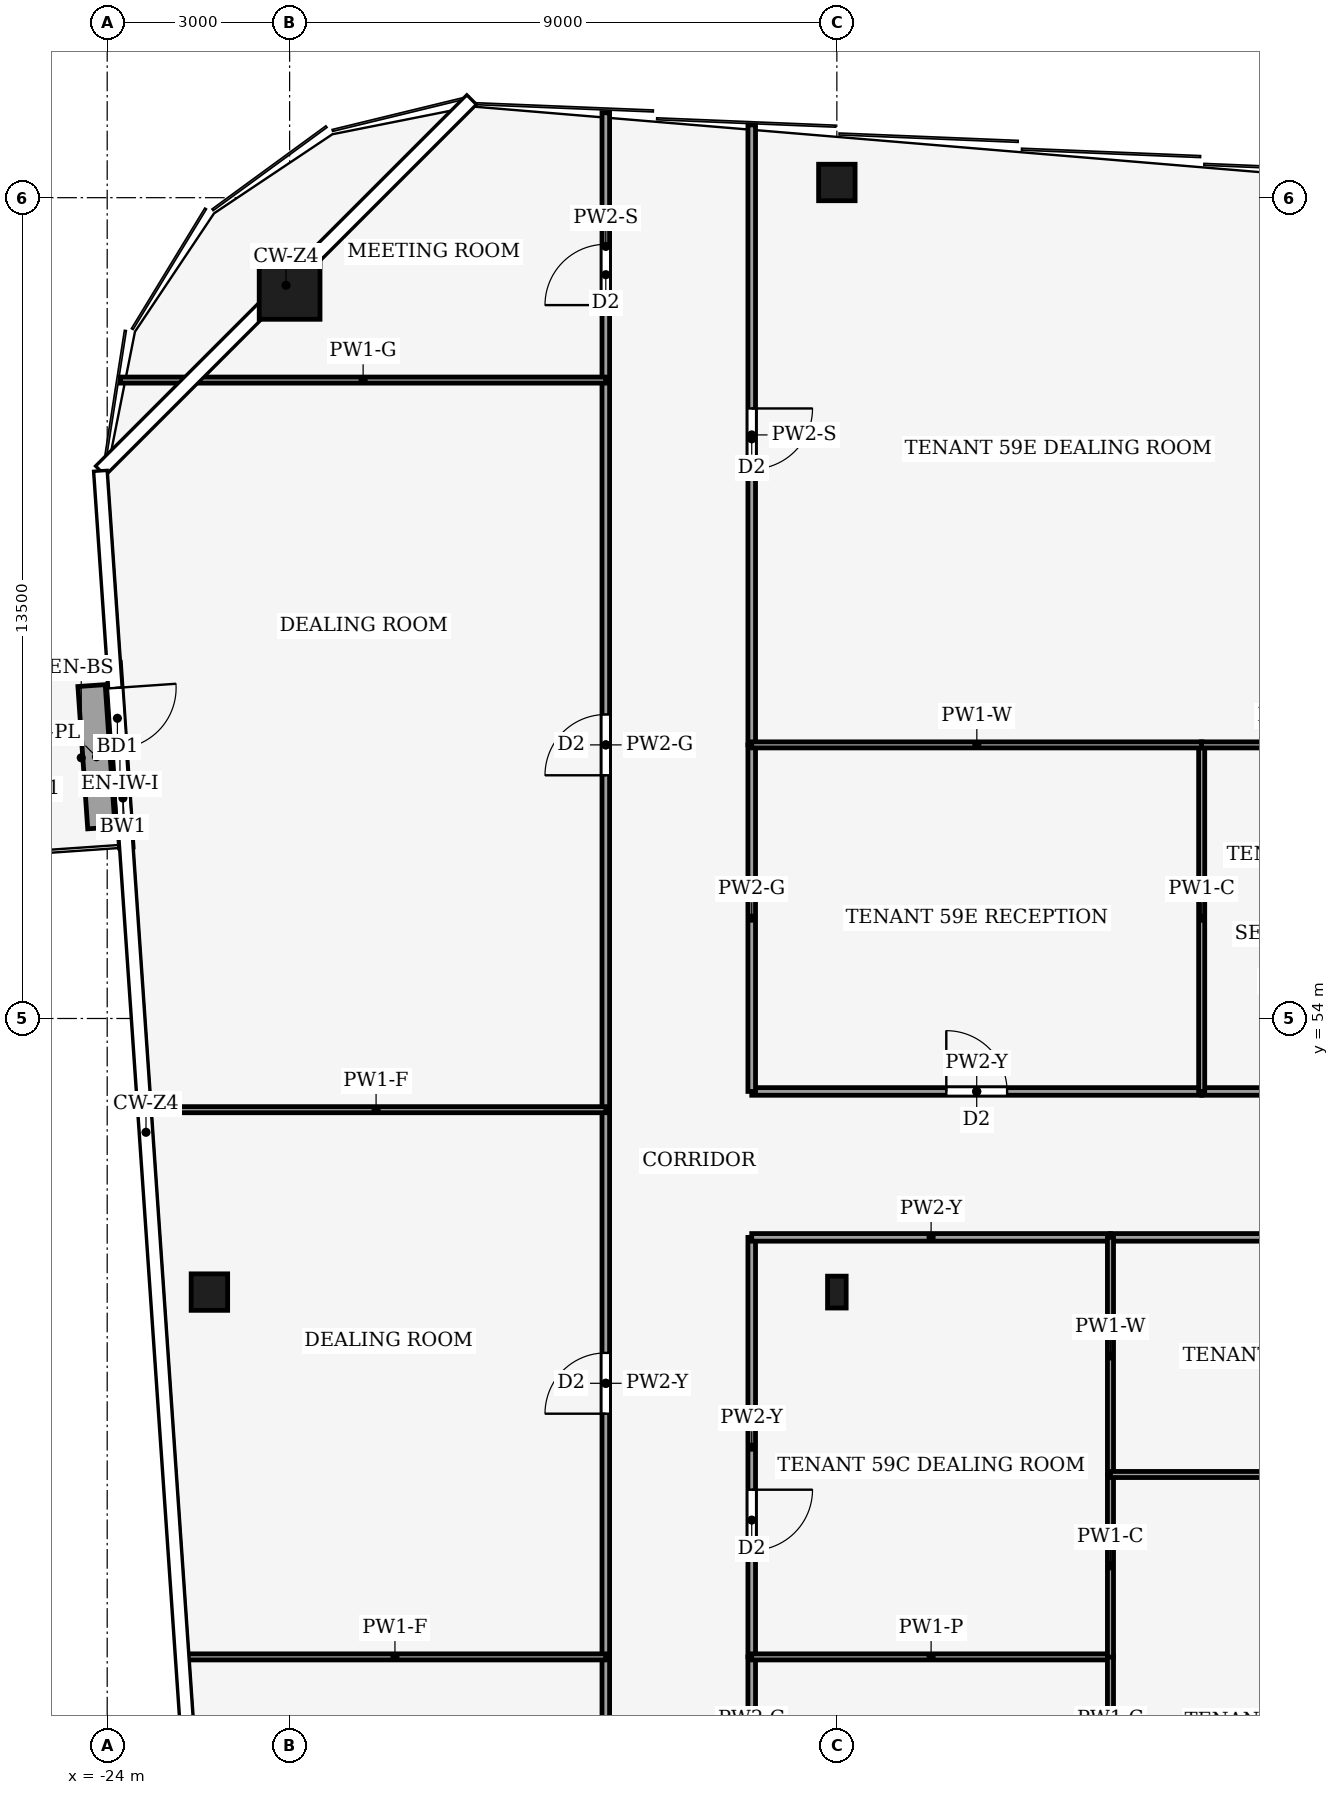
"""IFC4 building model, lengths in metres.
Left out: names, types, materials, properties, quantities, classifications, styles, units other than length and angle.
Written with IfcOpenShell. Run it as: python <this file> out.ifc"""

import sys

from ifc_helpers import new_model, si_unit, direction, frame, frame_2d, origin, origin_2d, place, context, subcontext, project, spatial, rectangle, hollow_rectangle, i_section, extrude, element, fill, save


model = new_model("IFC4")
c1 = context("Model", 3, precision=1e-05, world=origin(), true_north=direction((0.0, 1.0)))
c2 = subcontext(c1, "Body", "Model", "MODEL_VIEW")
j1 = project(units=[si_unit("LENGTHUNIT", "METRE"), si_unit("PLANEANGLEUNIT", "RADIAN")], contexts=[c1])
p1 = place(None, origin())
s1 = spatial("IfcSite", under=j1, at=p1, CompositionType="ELEMENT")
p2 = place(p1, origin())
s2 = spatial("IfcBuilding", under=s1, at=p2, CompositionType="ELEMENT")
p3 = place(p2, frame((0.0, 0.0, 258.0)))
s3 = spatial("IfcBuildingStorey", under=s2, at=p3, CompositionType="ELEMENT", Elevation=258.0)
p4 = place(p3, frame((-21.0, 66.0, 0.0), z_axis=(0.0, 0.0, 1.0), x_axis=(1.0, 0.0, 0.0)))
e1 = element("IfcColumn", 1, at=p4, inside=s3, PredefinedType="COLUMN", context=c2, shape_type="SweptSolid", body=[
    extrude(hollow_rectangle(XDim=1.0, YDim=1.0, WallThickness=0.045, at=origin_2d()), origin(), (0.0, 0.0, 1.0), 4.0),
])
for number, where, z_axis, x_axis in (
    (2, (-12.0, 67.75, 0.0), (0.0, 0.0, 1.0), (1.0, 0.0, 0.0)),
    (3, (-22.319, 49.5, 0.0), (0.0, 0.0, 1.0), (1.0, 0.0, 0.0)),
):
    element("IfcColumn", number, at=place(p3, frame(where, z_axis=z_axis, x_axis=x_axis)), inside=s3, PredefinedType="COLUMN", context=c2, shape_type="SweptSolid", body=[
        extrude(hollow_rectangle(XDim=0.6, YDim=0.6, WallThickness=0.025, at=origin_2d()), origin(), (0.0, 0.0, 1.0), 4.0),
    ])
p5 = place(p3, frame((-12.0, 49.5, 0.0), z_axis=(0.0, 0.0, 1.0), x_axis=(1.0, 0.0, 0.0)))
e4 = element("IfcColumn", 4, at=p5, inside=s3, PredefinedType="COLUMN", context=c2, shape_type="SweptSolid", body=[
    extrude(i_section(OverallWidth=0.306, OverallDepth=0.524, WebThickness=0.012, FlangeThickness=0.04, FilletRadius=0.027, at=origin_2d()), origin(), (0.0, 0.0, 1.0), 4.0),
])
p6 = place(p3, frame((-23.895, 59.851, 0.0), z_axis=(0.0, 0.0, 1.0), x_axis=(0.06875808698, -0.99763336225, 0.0)))
e5 = element("IfcWall", 5, at=p6, inside=s3, PredefinedType="SOLIDWALL", context=c2, shape_type="SweptSolid", body=[
    extrude(rectangle(XDim=3.047, YDim=0.224, at=frame_2d((1.523, 0.0))), origin(), (0.0, 0.0, 1.0), 3.65),
])
p7 = place(p6, frame((0.416, 0.0, 0.0)))
e6 = element("IfcOpeningElement", 6, at=p7, cuts=e5, PredefinedType="OPENING", context=c2, shape_type="SweptSolid", body=[
    extrude(rectangle(XDim=1.0, YDim=2.1, at=frame_2d((0.5, 1.05))), frame((0.0, 0.122, 0.0), z_axis=(0.0, -1.0, 0.0), x_axis=(1.0, 0.0, 0.0)), (0.0, 0.0, 1.0), 0.244),
])
p8 = place(p6, frame((1.831, 0.0, 0.9)))
e7 = element("IfcOpeningElement", 7, at=p8, cuts=e5, PredefinedType="OPENING", context=c2, shape_type="SweptSolid", body=[
    extrude(rectangle(XDim=0.8, YDim=1.2, at=frame_2d((0.4, 0.6))), frame((0.0, 0.122, 0.0), z_axis=(0.0, -1.0, 0.0), x_axis=(1.0, 0.0, 0.0)), (0.0, 0.0, 1.0), 0.244),
])
p9 = place(p3, frame((-24.257, 59.475, 0.0), z_axis=(0.0, 0.0, 1.0), x_axis=(0.06877709495, -0.997632052016, 0.0)))
e8 = element("IfcWall", 8, at=p9, inside=s3, PredefinedType="USERDEFINED", context=c2, shape_type="SweptSolid", body=[
    extrude(rectangle(XDim=2.346, YDim=0.45, at=frame_2d((1.173, 0.0))), origin(), (0.0, 0.0, 1.0), 0.4),
])
p10 = place(p3, frame((-15.8, 31.5, 0.0), z_axis=(0.0, 0.0, 1.0), x_axis=(0.0, 1.0, 0.0)))
e9 = element("IfcWall", 9, at=p10, inside=s3, PredefinedType="PARTITIONING", context=c2, shape_type="SweptSolid", body=[
    extrude(rectangle(XDim=12.0, YDim=0.125, at=frame_2d((6.0, 0.0))), origin(), (0.0, 0.0, 1.0), 3.14),
])
p11 = place(p10, frame((5.5, 0.0, 0.0)))
e10 = element("IfcOpeningElement", 10, at=p11, cuts=e9, PredefinedType="OPENING", context=c2, shape_type="SweptSolid", body=[
    extrude(rectangle(XDim=1.0, YDim=2.1, at=frame_2d((0.5, 1.05))), frame((0.0, 0.073, 0.0), z_axis=(0.0, -1.0, 0.0), x_axis=(1.0, 0.0, 0.0)), (0.0, 0.0, 1.0), 0.145),
])
p12 = place(p3, frame((-15.8, 43.5, 0.0), z_axis=(0.0, 0.0, 1.0), x_axis=(0.0, 1.0, 0.0)))
e11 = element("IfcWall", 11, at=p12, inside=s3, PredefinedType="PARTITIONING", context=c2, shape_type="SweptSolid", body=[
    extrude(rectangle(XDim=9.0, YDim=0.125, at=frame_2d((4.5, 0.0))), origin(), (0.0, 0.0, 1.0), 3.24),
])
p13 = place(p12, frame((4.0, 0.0, 0.0)))
e12 = element("IfcOpeningElement", 12, at=p13, cuts=e11, PredefinedType="OPENING", context=c2, shape_type="SweptSolid", body=[
    extrude(rectangle(XDim=1.0, YDim=2.1, at=frame_2d((0.5, 1.05))), frame((0.0, 0.073, 0.0), z_axis=(0.0, -1.0, 0.0), x_axis=(1.0, 0.0, 0.0)), (0.0, 0.0, 1.0), 0.145),
])
p14 = place(p3, frame((-15.8, 52.5, 0.0), z_axis=(0.0, 0.0, 1.0), x_axis=(0.0, 1.0, 0.0)))
e13 = element("IfcWall", 13, at=p14, inside=s3, PredefinedType="PARTITIONING", context=c2, shape_type="SweptSolid", body=[
    extrude(rectangle(XDim=12.0, YDim=0.125, at=frame_2d((6.0, 0.0))), origin(), (0.0, 0.0, 1.0), 3.87),
])
p15 = place(p14, frame((5.5, 0.0, 0.0)))
e14 = element("IfcOpeningElement", 14, at=p15, cuts=e13, PredefinedType="OPENING", context=c2, shape_type="SweptSolid", body=[
    extrude(rectangle(XDim=1.0, YDim=2.1, at=frame_2d((0.5, 1.05))), frame((0.0, 0.073, 0.0), z_axis=(0.0, -1.0, 0.0), x_axis=(1.0, 0.0, 0.0)), (0.0, 0.0, 1.0), 0.145),
])
p16 = place(p3, frame((-15.8, 64.5, 0.0), z_axis=(0.0, 0.0, 1.0), x_axis=(0.0, 1.0, 0.0)))
e15 = element("IfcWall", 15, at=p16, inside=s3, PredefinedType="PARTITIONING", context=c2, shape_type="SweptSolid", body=[
    extrude(rectangle(XDim=4.397, YDim=0.125, at=frame_2d((2.198, 0.0))), origin(), (0.0, 0.0, 1.0), 3.04),
])
p17 = place(p16, frame((1.233, 0.0, 0.0)))
e16 = element("IfcOpeningElement", 16, at=p17, cuts=e15, PredefinedType="OPENING", context=c2, shape_type="SweptSolid", body=[
    extrude(rectangle(XDim=1.0, YDim=2.1, at=frame_2d((0.5, 1.05))), frame((0.0, 0.073, 0.0), z_axis=(0.0, -1.0, 0.0), x_axis=(1.0, 0.0, 0.0)), (0.0, 0.0, 1.0), 0.145),
])
p18 = place(p3, frame((-13.4, 40.5, 0.0), z_axis=(0.0, 0.0, 1.0), x_axis=(0.0, 1.0, 0.0)))
e17 = element("IfcWall", 17, at=p18, inside=s3, PredefinedType="PARTITIONING", context=c2, shape_type="SweptSolid", body=[
    extrude(rectangle(XDim=3.0, YDim=0.125, at=frame_2d((1.5, 0.0))), origin(), (0.0, 0.0, 1.0), 3.87),
])
p19 = place(p3, frame((-13.4, 50.4, 0.0), z_axis=(0.0, 0.0, 1.0), x_axis=(0.0, -1.0, 0.0)))
e18 = element("IfcWall", 18, at=p19, inside=s3, PredefinedType="PARTITIONING", context=c2, shape_type="SweptSolid", body=[
    extrude(rectangle(XDim=6.9, YDim=0.125, at=frame_2d((3.45, 0.0))), origin(), (0.0, 0.0, 1.0), 3.24),
])
p20 = place(p19, frame((4.15, 0.0, 0.0)))
e19 = element("IfcOpeningElement", 19, at=p20, cuts=e18, PredefinedType="OPENING", context=c2, shape_type="SweptSolid", body=[
    extrude(rectangle(XDim=1.0, YDim=2.1, at=frame_2d((0.5, 1.05))), frame((0.0, 0.073, 0.0), z_axis=(0.0, -1.0, 0.0), x_axis=(1.0, 0.0, 0.0)), (0.0, 0.0, 1.0), 0.145),
])
p21 = place(p3, frame((-7.5, 50.4, 0.0), z_axis=(0.0, 0.0, 1.0), x_axis=(-1.0, 0.0, 0.0)))
e20 = element("IfcWall", 20, at=p21, inside=s3, PredefinedType="PARTITIONING", context=c2, shape_type="SweptSolid", body=[
    extrude(rectangle(XDim=5.9, YDim=0.125, at=frame_2d((2.95, 0.0))), origin(), (0.0, 0.0, 1.0), 3.24),
])
p22 = place(p3, frame((0.0, 50.4, 0.0), z_axis=(0.0, 0.0, 1.0), x_axis=(-1.0, 0.0, 0.0)))
e21 = element("IfcWall", 21, at=p22, inside=s3, PredefinedType="PARTITIONING", context=c2, shape_type="SweptSolid", body=[
    extrude(rectangle(XDim=7.5, YDim=0.125, at=frame_2d((3.75, 0.0))), origin(), (0.0, 0.0, 1.0), 3.24),
])
p23 = place(p22, frame((3.65, 0.0, 0.0)))
e22 = element("IfcOpeningElement", 22, at=p23, cuts=e21, PredefinedType="OPENING", context=c2, shape_type="SweptSolid", body=[
    extrude(rectangle(XDim=1.0, YDim=2.1, at=frame_2d((0.5, 1.05))), frame((0.0, 0.073, 0.0), z_axis=(0.0, -1.0, 0.0), x_axis=(1.0, 0.0, 0.0)), (0.0, 0.0, 1.0), 0.145),
])
p24 = place(p3, frame((-13.4, 52.8, 0.0), z_axis=(0.0, 0.0, 1.0), x_axis=(1.0, 0.0, 0.0)))
e23 = element("IfcWall", 23, at=p24, inside=s3, PredefinedType="PARTITIONING", context=c2, shape_type="SweptSolid", body=[
    extrude(rectangle(XDim=7.4, YDim=0.125, at=frame_2d((3.7, 0.0))), origin(), (0.0, 0.0, 1.0), 3.24),
])
p25 = place(p24, frame((3.2, 0.0, 0.0)))
e24 = element("IfcOpeningElement", 24, at=p25, cuts=e23, PredefinedType="OPENING", context=c2, shape_type="SweptSolid", body=[
    extrude(rectangle(XDim=1.0, YDim=2.1, at=frame_2d((0.5, 1.05))), frame((0.0, 0.073, 0.0), z_axis=(0.0, -1.0, 0.0), x_axis=(1.0, 0.0, 0.0)), (0.0, 0.0, 1.0), 0.145),
])
p26 = place(p3, frame((-13.4, 52.8, 0.0), z_axis=(0.0, 0.0, 1.0), x_axis=(0.0, 1.0, 0.0)))
e25 = element("IfcWall", 25, at=p26, inside=s3, PredefinedType="PARTITIONING", context=c2, shape_type="SweptSolid", body=[
    extrude(rectangle(XDim=5.7, YDim=0.125, at=frame_2d((2.85, 0.0))), origin(), (0.0, 0.0, 1.0), 3.87),
])
p27 = place(p3, frame((-3.0, 52.8, 0.0), z_axis=(0.0, 0.0, 1.0), x_axis=(-1.0, 0.0, 0.0)))
e26 = element("IfcWall", 26, at=p27, inside=s3, PredefinedType="PARTITIONING", context=c2, shape_type="SweptSolid", body=[
    extrude(rectangle(XDim=3.0, YDim=0.125, at=frame_2d((1.5, 0.0))), origin(), (0.0, 0.0, 1.0), 3.24),
])
p28 = place(p3, frame((-13.4, 68.697, 0.0), z_axis=(0.0, 0.0, 1.0), x_axis=(0.0, -1.0, 0.0)))
e27 = element("IfcWall", 27, at=p28, inside=s3, PredefinedType="PARTITIONING", context=c2, shape_type="SweptSolid", body=[
    extrude(rectangle(XDim=10.197, YDim=0.125, at=frame_2d((5.098, 0.0))), origin(), (0.0, 0.0, 1.0), 3.04),
])
p29 = place(p28, frame((4.663, 0.0, 0.0)))
e28 = element("IfcOpeningElement", 28, at=p29, cuts=e27, PredefinedType="OPENING", context=c2, shape_type="SweptSolid", body=[
    extrude(rectangle(XDim=1.0, YDim=2.1, at=frame_2d((0.5, 1.05))), frame((0.0, 0.073, 0.0), z_axis=(0.0, -1.0, 0.0), x_axis=(1.0, 0.0, 0.0)), (0.0, 0.0, 1.0), 0.145),
])
p30 = place(p3, frame((-15.8, 43.5, 0.0), z_axis=(0.0, 0.0, 1.0), x_axis=(-1.0, 0.0, 0.0)))
e29 = element("IfcWall", 29, at=p30, inside=s3, PredefinedType="PARTITIONING", context=c2, shape_type="SweptSolid", body=[
    extrude(rectangle(XDim=6.935, YDim=0.1, at=frame_2d((3.468, 0.0))), origin(), (0.0, 0.0, 1.0), 3.04),
])
p31 = place(p3, frame((-15.8, 52.5, 0.0), z_axis=(0.0, 0.0, 1.0), x_axis=(-1.0, 0.0, 0.0)))
e30 = element("IfcWall", 30, at=p31, inside=s3, PredefinedType="PARTITIONING", context=c2, shape_type="SweptSolid", body=[
    extrude(rectangle(XDim=7.556, YDim=0.1, at=frame_2d((3.778, 0.0))), origin(), (0.0, 0.0, 1.0), 3.04),
])
p32 = place(p3, frame((-15.8, 64.5, 0.0), z_axis=(0.0, 0.0, 1.0), x_axis=(-1.0, 0.0, 0.0)))
e31 = element("IfcWall", 31, at=p32, inside=s3, PredefinedType="PARTITIONING", context=c2, shape_type="SweptSolid", body=[
    extrude(rectangle(XDim=7.981, YDim=0.1, at=frame_2d((3.991, 0.0))), origin(), (0.0, 0.0, 1.0), 2.93),
])
p33 = place(p3, frame((-7.5, 43.5, 0.0), z_axis=(0.0, 0.0, 1.0), x_axis=(-1.0, 0.0, 0.0)))
e32 = element("IfcWall", 32, at=p33, inside=s3, PredefinedType="PARTITIONING", context=c2, shape_type="SweptSolid", body=[
    extrude(rectangle(XDim=5.9, YDim=0.1, at=frame_2d((2.95, 0.0))), origin(), (0.0, 0.0, 1.0), 3.44),
])
p34 = place(p3, frame((-7.5, 40.496, 0.0), z_axis=(0.0, 0.0, 1.0), x_axis=(0.0, 1.0, 0.0)))
e33 = element("IfcWall", 33, at=p34, inside=s3, PredefinedType="PARTITIONING", context=c2, shape_type="SweptSolid", body=[
    extrude(rectangle(XDim=3.008, YDim=0.1, at=frame_2d((1.504, 0.0))), origin(), (0.0, 0.0, 1.0), 3.87),
])
p35 = place(p3, frame((-7.5, 43.496, 0.0), z_axis=(0.0, 0.0, 1.0), x_axis=(0.0, 1.0, 0.0)))
e34 = element("IfcWall", 34, at=p35, inside=s3, PredefinedType="PARTITIONING", context=c2, shape_type="SweptSolid", body=[
    extrude(rectangle(XDim=3.004, YDim=0.1, at=frame_2d((1.502, 0.0))), origin(), (0.0, 0.0, 1.0), 3.87),
])
p36 = place(p3, frame((-7.5, 46.5, 0.0), z_axis=(0.0, 0.0, 1.0), x_axis=(0.0, 1.0, 0.0)))
e35 = element("IfcWall", 35, at=p36, inside=s3, PredefinedType="PARTITIONING", context=c2, shape_type="SweptSolid", body=[
    extrude(rectangle(XDim=3.9, YDim=0.1, at=frame_2d((1.95, 0.0))), origin(), (0.0, 0.0, 1.0), 3.24),
])
p37 = place(p3, frame((0.0, 46.5, 0.0), z_axis=(0.0, 0.0, 1.0), x_axis=(-1.0, 0.0, 0.0)))
e36 = element("IfcWall", 36, at=p37, inside=s3, PredefinedType="PARTITIONING", context=c2, shape_type="SweptSolid", body=[
    extrude(rectangle(XDim=7.5, YDim=0.1, at=frame_2d((3.75, 0.0))), origin(), (0.0, 0.0, 1.0), 3.44),
])
p38 = place(p3, frame((-6.0, 52.8, 0.0), z_axis=(0.0, 0.0, 1.0), x_axis=(0.0, 1.0, 0.0)))
e37 = element("IfcWall", 37, at=p38, inside=s3, PredefinedType="PARTITIONING", context=c2, shape_type="SweptSolid", body=[
    extrude(rectangle(XDim=5.7, YDim=0.1, at=frame_2d((2.85, 0.0))), origin(), (0.0, 0.0, 1.0), 3.87),
])
p39 = place(p3, frame((-5.996, 58.5, 0.0), z_axis=(0.0, 0.0, 1.0), x_axis=(-1.0, 0.0, 0.0)))
e38 = element("IfcWall", 38, at=p39, inside=s3, PredefinedType="PARTITIONING", context=c2, shape_type="SweptSolid", body=[
    extrude(rectangle(XDim=7.404, YDim=0.1, at=frame_2d((3.702, 0.0))), origin(), (0.0, 0.0, 1.0), 3.24),
])
p40 = place(p3, frame((-3.0, 58.5, 0.0), z_axis=(0.0, 0.0, 1.0), x_axis=(-1.0, 0.0, 0.0)))
e39 = element("IfcWall", 39, at=p40, inside=s3, PredefinedType="PARTITIONING", context=c2, shape_type="SweptSolid", body=[
    extrude(rectangle(XDim=3.004, YDim=0.1, at=frame_2d((1.502, 0.0))), origin(), (0.0, 0.0, 1.0), 3.24),
])
p41 = place(p7, origin())
e40 = element("IfcDoor", 40, at=p41, inside=s3, OperationType="SINGLE_SWING_LEFT", PredefinedType="DOOR", context=c2, shape_type="SweptSolid", body=[
    extrude(rectangle(XDim=1.0, YDim=2.1, at=frame_2d((0.5, 1.05))), frame((0.0, 0.025, 0.0), z_axis=(0.0, -1.0, 0.0), x_axis=(1.0, 0.0, 0.0)), (0.0, 0.0, 1.0), 0.05),
])
fill(e6, e40)
p42 = place(p8, origin())
e41 = element("IfcWindow", 41, at=p42, inside=s3, PartitioningType="SINGLE_PANEL", PredefinedType="WINDOW", context=c2, shape_type="SweptSolid", body=[
    extrude(rectangle(XDim=0.8, YDim=1.2, at=frame_2d((0.4, 0.6))), frame((0.0, 0.03, 0.0), z_axis=(0.0, -1.0, 0.0), x_axis=(1.0, 0.0, 0.0)), (0.0, 0.0, 1.0), 0.06),
])
fill(e7, e41)
p43 = place(p13, origin())
e42 = element("IfcDoor", 42, at=p43, inside=s3, OperationType="SINGLE_SWING_RIGHT", PredefinedType="DOOR", context=c2, shape_type="SweptSolid", body=[
    extrude(rectangle(XDim=1.0, YDim=2.1, at=frame_2d((0.5, 1.05))), frame((0.0, 0.025, 0.0), z_axis=(0.0, -1.0, 0.0), x_axis=(1.0, 0.0, 0.0)), (0.0, 0.0, 1.0), 0.05),
])
fill(e12, e42)
p44 = place(p15, origin())
e43 = element("IfcDoor", 43, at=p44, inside=s3, OperationType="SINGLE_SWING_LEFT", PredefinedType="DOOR", context=c2, shape_type="SweptSolid", body=[
    extrude(rectangle(XDim=1.0, YDim=2.1, at=frame_2d((0.5, 1.05))), frame((0.0, 0.025, 0.0), z_axis=(0.0, -1.0, 0.0), x_axis=(1.0, 0.0, 0.0)), (0.0, 0.0, 1.0), 0.05),
])
fill(e14, e43)
p45 = place(p17, origin())
e44 = element("IfcDoor", 44, at=p45, inside=s3, OperationType="SINGLE_SWING_LEFT", PredefinedType="DOOR", context=c2, shape_type="SweptSolid", body=[
    extrude(rectangle(XDim=1.0, YDim=2.1, at=frame_2d((0.5, 1.05))), frame((0.0, 0.025, 0.0), z_axis=(0.0, -1.0, 0.0), x_axis=(1.0, 0.0, 0.0)), (0.0, 0.0, 1.0), 0.05),
])
fill(e16, e44)
p46 = place(p20, origin())
e45 = element("IfcDoor", 45, at=p46, inside=s3, OperationType="SINGLE_SWING_RIGHT", PredefinedType="DOOR", context=c2, shape_type="SweptSolid", body=[
    extrude(rectangle(XDim=1.0, YDim=2.1, at=frame_2d((0.5, 1.05))), frame((0.0, 0.025, 0.0), z_axis=(0.0, -1.0, 0.0), x_axis=(1.0, 0.0, 0.0)), (0.0, 0.0, 1.0), 0.05),
])
fill(e19, e45)
p47 = place(p25, origin())
e46 = element("IfcDoor", 46, at=p47, inside=s3, OperationType="SINGLE_SWING_RIGHT", PredefinedType="DOOR", context=c2, shape_type="SweptSolid", body=[
    extrude(rectangle(XDim=1.0, YDim=2.1, at=frame_2d((0.5, 1.05))), frame((0.0, 0.025, 0.0), z_axis=(0.0, -1.0, 0.0), x_axis=(1.0, 0.0, 0.0)), (0.0, 0.0, 1.0), 0.05),
])
fill(e24, e46)
p48 = place(p29, origin())
e47 = element("IfcDoor", 47, at=p48, inside=s3, OperationType="SINGLE_SWING_RIGHT", PredefinedType="DOOR", context=c2, shape_type="SweptSolid", body=[
    extrude(rectangle(XDim=1.0, YDim=2.1, at=frame_2d((0.5, 1.05))), frame((0.0, 0.025, 0.0), z_axis=(0.0, -1.0, 0.0), x_axis=(1.0, 0.0, 0.0)), (0.0, 0.0, 1.0), 0.05),
])
fill(e28, e47)
save(model, sys.argv[1])
